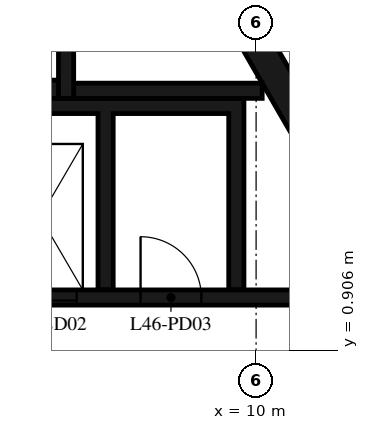
"""IFC4 building model, lengths in metres.
Left out: names, types, materials, properties, quantities, classifications, styles, units other than length and angle.
Written with IfcOpenShell. Run it as: python <this file> out.ifc"""

import sys

from ifc_helpers import new_model, si_unit, direction, frame, frame_2d, origin, place, context, subcontext, project, spatial, polyline, rectangle, outline, extrude, element, fill, save


model = new_model("IFC4")
c1 = context("Model", 3, precision=1e-05, world=origin(), true_north=direction((0.0, 1.0)))
c2 = subcontext(c1, "Body", "Model", "MODEL_VIEW")
j1 = project(units=[si_unit("LENGTHUNIT", "METRE"), si_unit("PLANEANGLEUNIT", "RADIAN")], contexts=[c1])
p1 = place(None, origin())
s1 = spatial("IfcSite", under=j1, at=p1, CompositionType="ELEMENT")
p2 = place(p1, origin())
s2 = spatial("IfcBuilding", under=s1, at=p2, CompositionType="ELEMENT")
p3 = place(p2, frame((0.0, 0.0, 183.2)))
s3 = spatial("IfcBuildingStorey", under=s2, at=p3, CompositionType="ELEMENT", Elevation=183.2)
p4 = place(p3, frame((10.845, 4.51, 0.0), z_axis=(0.0, 0.0, 1.0), x_axis=(-0.500087131594, 0.865975092491, 0.0)))
e1 = element("IfcWall", 1, at=p4, inside=s3, PredefinedType="SHEAR", context=c2, shape_type="SweptSolid", body=[
    extrude(rectangle(XDim=3.033, YDim=0.5, at=frame_2d((1.516, 0.0))), origin(), (0.0, 0.0, 1.0), 4.75),
])
p5 = place(p3, frame((0.0, 5.2, 0.0), z_axis=(0.0, 0.0, 1.0), x_axis=(1.0, 0.0, 0.0)))
e2 = element("IfcWall", 2, at=p5, inside=s3, PredefinedType="SHEAR", context=c2, shape_type="SweptSolid", body=[
    extrude(rectangle(XDim=6.75, YDim=0.3, at=frame_2d((3.375, 0.0))), origin(), (0.0, 0.0, 1.0), 4.75),
])
p6 = place(p3, frame((6.875, 5.05, 0.0), z_axis=(0.0, 0.0, 1.0), x_axis=(0.0, 1.0, 0.0)))
e3 = element("IfcWall", 3, at=p6, inside=s3, PredefinedType="SHEAR", context=c2, shape_type="SweptSolid", body=[
    extrude(rectangle(XDim=3.92, YDim=0.25, at=frame_2d((1.96, 0.0))), origin(), (0.0, 0.0, 1.0), 4.75),
])
p7 = place(p6, frame((1.11, 0.0, 0.0)))
e4 = element("IfcOpeningElement", 4, at=p7, cuts=e3, PredefinedType="OPENING", context=c2, shape_type="SweptSolid", body=[
    extrude(rectangle(XDim=1.2, YDim=2.1, at=frame_2d((0.6, 1.05))), frame((0.0, 0.135, 0.0), z_axis=(0.0, -1.0, 0.0), x_axis=(1.0, 0.0, 0.0)), (0.0, 0.0, 1.0), 0.27),
])
p8 = place(p3, frame((7.0, 5.175, 0.0), z_axis=(0.0, 0.0, 1.0), x_axis=(1.0, 0.0, 0.0)))
e5 = element("IfcWall", 5, at=p8, inside=s3, PredefinedType="SHEAR", context=c2, shape_type="SweptSolid", body=[
    extrude(rectangle(XDim=3.1, YDim=0.25, at=frame_2d((1.55, 0.0))), origin(), (0.0, 0.0, 1.0), 4.75),
])
p9 = place(p3, origin())
e6 = element("IfcWall", 6, at=p9, inside=s3, PredefinedType="SHEAR", context=c2, shape_type="SweptSolid", body=[
    extrude(outline(polyline([(-9.55, 4.8), (-5.5, 4.8), (-5.5, 1.9), (-5.25, 1.9), (-5.25, 4.8), (-1.2, 4.8), (-1.2, 1.9), (-0.95, 1.9), (-0.95, 4.8), (0.95, 4.8), (0.95, 1.9), (1.2, 1.9), (1.2, 4.8), (3.1, 4.8), (3.1, 1.9), (3.35, 1.9), (3.35, 4.8), (5.25, 4.8), (5.25, 1.9), (5.5, 1.9), (5.5, 4.8), (7.4, 4.8), (7.4, 1.9), (7.65, 1.9), (7.65, 4.8), (9.55, 4.8), (9.55, 1.9), (9.8, 1.9), (9.8, 4.8), (9.8, 5.05), (-9.8, 5.05), (-9.8, 4.8), (-9.8, 1.9), (-9.55, 1.9), (-9.55, 4.8)])), origin(), (0.0, 0.0, 1.0), 4.75),
])
p10 = place(p3, frame((3.35, 1.775, 0.0), z_axis=(0.0, 0.0, 1.0), x_axis=(1.0, 0.0, 0.0)))
e7 = element("IfcWall", 7, at=p10, inside=s3, PredefinedType="SHEAR", context=c2, shape_type="SweptSolid", body=[
    extrude(rectangle(XDim=7.93, YDim=0.25, at=frame_2d((3.965, 0.0))), origin(), (0.0, 0.0, 1.0), 4.75),
])
p11 = place(p10, frame((0.35, 0.0, 0.0)))
e8 = element("IfcOpeningElement", 8, at=p11, cuts=e7, PredefinedType="OPENING", context=c2, shape_type="SweptSolid", body=[
    extrude(rectangle(XDim=1.2, YDim=2.4, at=frame_2d((0.6, 1.2))), frame((0.0, 0.135, 0.0), z_axis=(0.0, -1.0, 0.0), x_axis=(1.0, 0.0, 0.0)), (0.0, 0.0, 1.0), 0.27),
])
p12 = place(p10, frame((2.5, 0.0, 0.0)))
e9 = element("IfcOpeningElement", 9, at=p12, cuts=e7, PredefinedType="OPENING", context=c2, shape_type="SweptSolid", body=[
    extrude(rectangle(XDim=1.2, YDim=2.4, at=frame_2d((0.6, 1.2))), frame((0.0, 0.135, 0.0), z_axis=(0.0, -1.0, 0.0), x_axis=(1.0, 0.0, 0.0)), (0.0, 0.0, 1.0), 0.27),
])
p13 = place(p10, frame((4.75, 0.0, 0.0)))
e10 = element("IfcOpeningElement", 10, at=p13, cuts=e7, PredefinedType="OPENING", context=c2, shape_type="SweptSolid", body=[
    extrude(rectangle(XDim=1.0, YDim=2.4, at=frame_2d((0.5, 1.2))), frame((0.0, 0.135, 0.0), z_axis=(0.0, -1.0, 0.0), x_axis=(1.0, 0.0, 0.0)), (0.0, 0.0, 1.0), 0.27),
])
p14 = place(p12, origin())
e11 = element("IfcDoor", 11, at=p14, inside=s3, OperationType="DOUBLE_DOOR_SLIDING", PredefinedType="DOOR", context=c2, shape_type="SweptSolid", body=[
    extrude(rectangle(XDim=1.2, YDim=2.4, at=frame_2d((0.6, 1.2))), frame((0.0, 0.025, 0.0), z_axis=(0.0, -1.0, 0.0), x_axis=(1.0, 0.0, 0.0)), (0.0, 0.0, 1.0), 0.05),
])
fill(e9, e11)
p15 = place(p13, origin())
e12 = element("IfcDoor", 12, at=p15, inside=s3, OperationType="SINGLE_SWING_LEFT", PredefinedType="DOOR", context=c2, shape_type="SweptSolid", body=[
    extrude(rectangle(XDim=1.0, YDim=2.4, at=frame_2d((0.5, 1.2))), frame((0.0, 0.025, 0.0), z_axis=(0.0, -1.0, 0.0), x_axis=(1.0, 0.0, 0.0)), (0.0, 0.0, 1.0), 0.05),
])
fill(e10, e12)
save(model, sys.argv[1])
